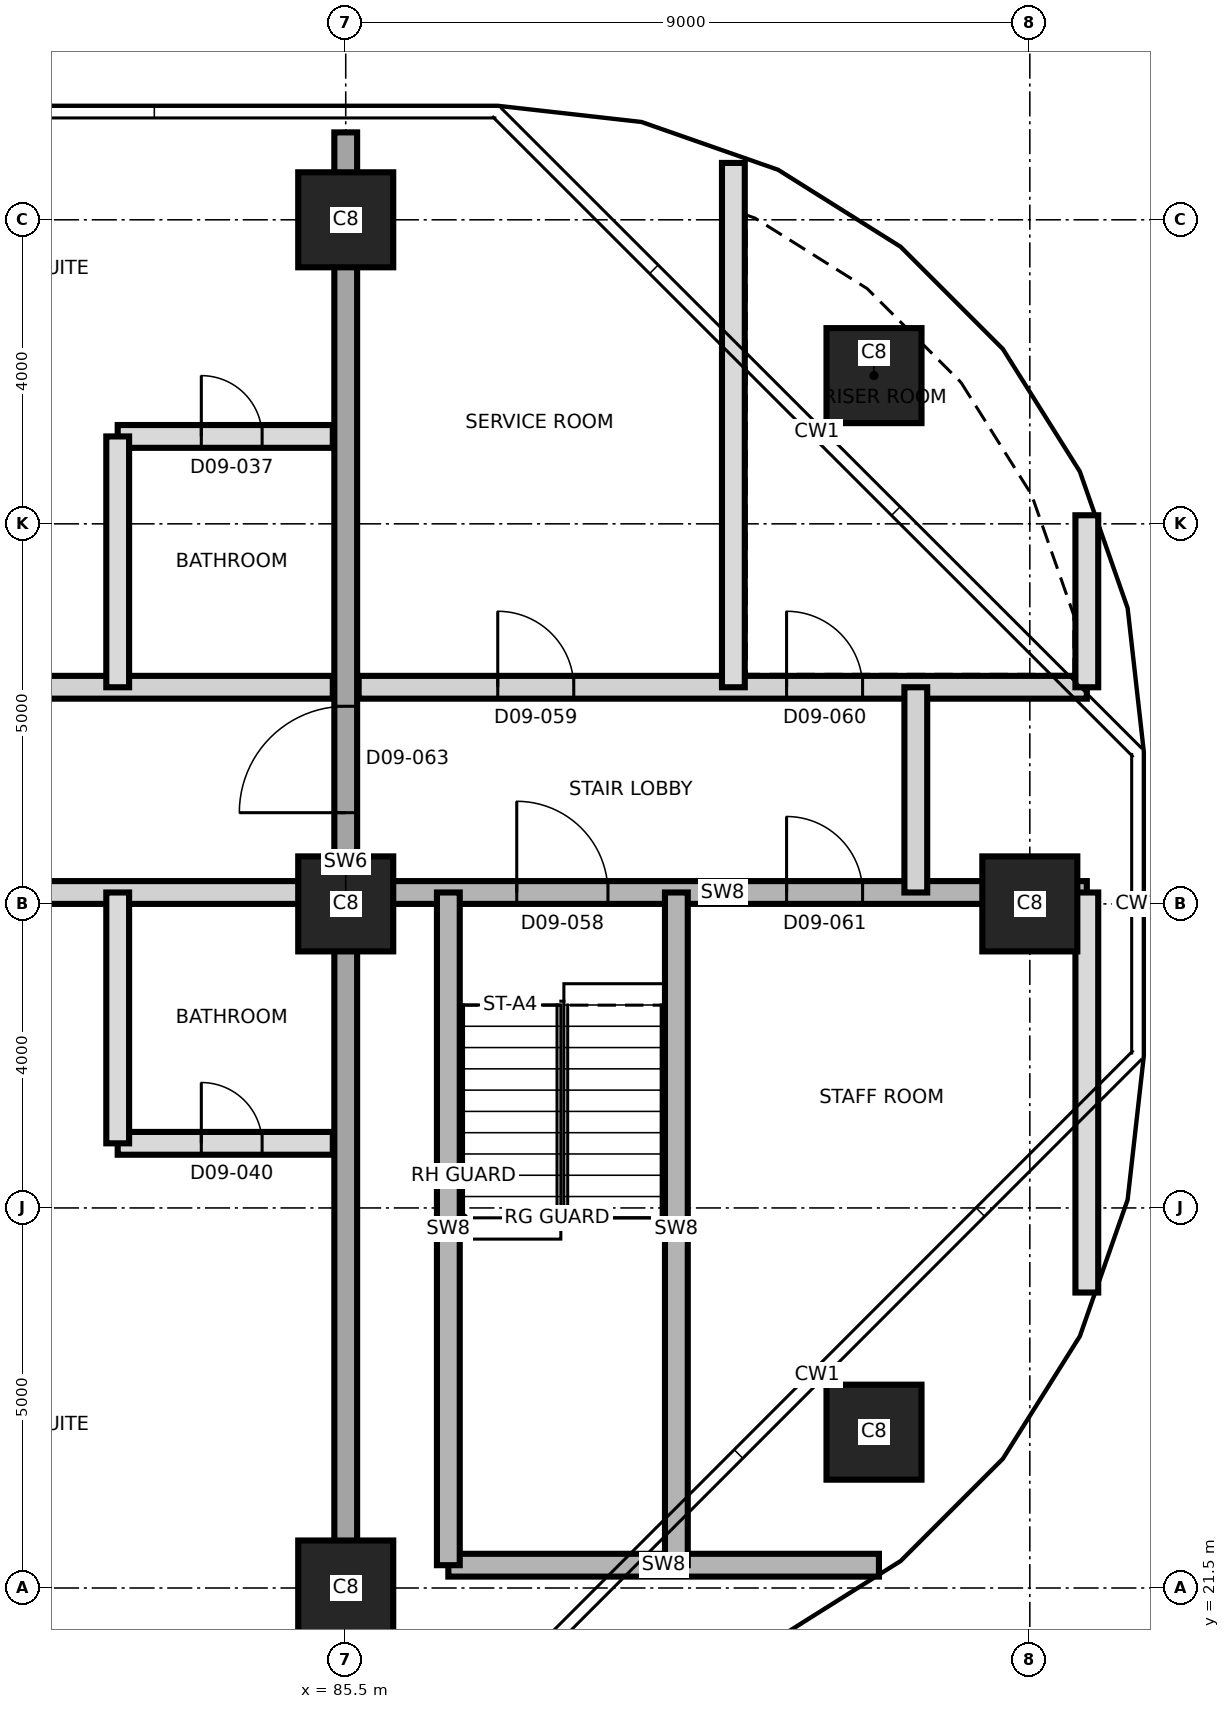
"""IFC4 building model, lengths in metres.
Left out: names, types, materials, properties, quantities, classifications, styles, units other than length and angle.
Written with IfcOpenShell. Run it as: python <this file> out.ifc"""

import sys

from ifc_helpers import new_model, si_unit, direction, frame, frame_2d, origin, origin_2d, place, context, subcontext, project, spatial, rectangle, extrude, element, fill, save


model = new_model("IFC4")
c1 = context("Model", 3, precision=1e-05, world=origin(), true_north=direction((0.0, 1.0)))
c2 = subcontext(c1, "Body", "Model", "MODEL_VIEW")
j1 = project(units=[si_unit("LENGTHUNIT", "METRE"), si_unit("PLANEANGLEUNIT", "RADIAN")], contexts=[c1])
p1 = place(None, origin())
s1 = spatial("IfcSite", under=j1, at=p1, CompositionType="ELEMENT")
p2 = place(p1, origin())
s2 = spatial("IfcBuilding", under=s1, at=p2, CompositionType="ELEMENT")
p3 = place(p2, frame((0.0, 0.0, 113.0)))
s3 = spatial("IfcBuildingStorey", under=s2, at=p3, CompositionType="ELEMENT", Elevation=113.0)
for number, where, z_axis, x_axis in (
    (1, (85.5, 21.5, 0.0), (0.0, 0.0, 1.0), (1.0, 0.0, 0.0)),
    (2, (92.45, 23.55, 0.0), (0.0, 0.0, 1.0), (1.0, 0.0, 0.0)),
    (3, (85.5, 30.5, 0.0), (0.0, 0.0, 1.0), (1.0, 0.0, 0.0)),
    (4, (94.5, 30.5, 0.0), (0.0, 0.0, 1.0), (1.0, 0.0, 0.0)),
    (5, (92.45, 37.45, 0.0), (0.0, 0.0, 1.0), (1.0, 0.0, 0.0)),
    (6, (85.5, 39.5, 0.0), (0.0, 0.0, 1.0), (1.0, 0.0, 0.0)),
):
    element("IfcColumn", number, at=place(p3, frame(where, z_axis=z_axis, x_axis=x_axis)), inside=s3, PredefinedType="COLUMN", context=c2, shape_type="SweptSolid", body=[
        extrude(rectangle(XDim=1.25, YDim=1.25, at=origin_2d()), origin(), (0.0, 0.0, 1.0), 3.7),
    ])
p4 = place(p3, frame((85.5, 20.35, 0.0), z_axis=(0.0, 0.0, 1.0), x_axis=(0.0, 1.0, 0.0)))
e7 = element("IfcWall", 7, at=p4, inside=s3, PredefinedType="SHEAR", context=c2, shape_type="SweptSolid", body=[
    extrude(rectangle(XDim=20.3, YDim=0.3, at=frame_2d((10.15, 0.0))), origin(), (0.0, 0.0, 1.0), 3.7),
])
p5 = place(p4, frame((11.35, 0.0, 0.0)))
e8 = element("IfcOpeningElement", 8, at=p5, cuts=e7, PredefinedType="OPENING", context=c2, shape_type="SweptSolid", body=[
    extrude(rectangle(XDim=1.4, YDim=2.1, at=frame_2d((0.7, 1.05))), frame((0.0, 0.16, 0.0), z_axis=(0.0, -1.0, 0.0), x_axis=(1.0, 0.0, 0.0)), (0.0, 0.0, 1.0), 0.32),
])
p6 = place(p3, frame((86.85, 21.8, 0.0), z_axis=(0.0, 0.0, 1.0), x_axis=(1.0, 0.0, 0.0)))
e9 = element("IfcWall", 9, at=p6, inside=s3, PredefinedType="SHEAR", context=c2, shape_type="SweptSolid", body=[
    extrude(rectangle(XDim=5.665, YDim=0.3, at=frame_2d((2.833, 0.0))), origin(), (0.0, 0.0, 1.0), 3.4),
])
p7 = place(p3, frame((82.5, 27.35, 0.0), z_axis=(0.0, 0.0, 1.0), x_axis=(1.0, 0.0, 0.0)))
e10 = element("IfcWall", 10, at=p7, inside=s3, PredefinedType="PARTITIONING", context=c2, shape_type="SweptSolid", body=[
    extrude(rectangle(XDim=2.83, YDim=0.3, at=frame_2d((1.415, 0.0))), origin(), (0.0, 0.0, 1.0), 3.4),
])
p8 = place(p7, frame((1.1, 0.0, 0.0)))
e11 = element("IfcOpeningElement", 11, at=p8, cuts=e10, PredefinedType="OPENING", context=c2, shape_type="SweptSolid", body=[
    extrude(rectangle(XDim=0.8, YDim=2.1, at=frame_2d((0.4, 1.05))), frame((0.0, 0.16, 0.0), z_axis=(0.0, -1.0, 0.0), x_axis=(1.0, 0.0, 0.0)), (0.0, 0.0, 1.0), 0.32),
])
p9 = place(p3, frame((58.8, 30.65, 0.0), z_axis=(0.0, 0.0, 1.0), x_axis=(1.0, 0.0, 0.0)))
e12 = element("IfcWall", 12, at=p9, inside=s3, PredefinedType="PARTITIONING", context=c2, shape_type="SweptSolid", body=[
    extrude(rectangle(XDim=26.53, YDim=0.3, at=frame_2d((13.265, 0.0))), origin(), (0.0, 0.0, 1.0), 3.4),
])
p10 = place(p9, frame((3.115, 0.0, 0.0)))
e13 = element("IfcOpeningElement", 13, at=p10, cuts=e12, PredefinedType="OPENING", context=c2, shape_type="SweptSolid", body=[
    extrude(rectangle(XDim=1.0, YDim=2.1, at=frame_2d((0.5, 1.05))), frame((0.0, 0.16, 0.0), z_axis=(0.0, -1.0, 0.0), x_axis=(1.0, 0.0, 0.0)), (0.0, 0.0, 1.0), 0.32),
])
p11 = place(p9, frame((6.065, 0.0, 0.0)))
e14 = element("IfcOpeningElement", 14, at=p11, cuts=e12, PredefinedType="OPENING", context=c2, shape_type="SweptSolid", body=[
    extrude(rectangle(XDim=1.4, YDim=2.1, at=frame_2d((0.7, 1.05))), frame((0.0, 0.16, 0.0), z_axis=(0.0, -1.0, 0.0), x_axis=(1.0, 0.0, 0.0)), (0.0, 0.0, 1.0), 0.32),
])
p12 = place(p9, frame((9.835, 0.0, 0.0)))
e15 = element("IfcOpeningElement", 15, at=p12, cuts=e12, PredefinedType="OPENING", context=c2, shape_type="SweptSolid", body=[
    extrude(rectangle(XDim=1.2, YDim=2.1, at=frame_2d((0.6, 1.05))), frame((0.0, 0.16, 0.0), z_axis=(0.0, -1.0, 0.0), x_axis=(1.0, 0.0, 0.0)), (0.0, 0.0, 1.0), 0.32),
])
p13 = place(p9, frame((13.085, 0.0, 0.0)))
e16 = element("IfcOpeningElement", 16, at=p13, cuts=e12, PredefinedType="OPENING", context=c2, shape_type="SweptSolid", body=[
    extrude(rectangle(XDim=1.0, YDim=2.1, at=frame_2d((0.5, 1.05))), frame((0.0, 0.16, 0.0), z_axis=(0.0, -1.0, 0.0), x_axis=(1.0, 0.0, 0.0)), (0.0, 0.0, 1.0), 0.32),
])
p14 = place(p9, frame((21.7, 0.0, 0.0)))
e17 = element("IfcOpeningElement", 17, at=p14, cuts=e12, PredefinedType="OPENING", context=c2, shape_type="SweptSolid", body=[
    extrude(rectangle(XDim=1.0, YDim=2.4, at=frame_2d((0.5, 1.2))), frame((0.0, 0.16, 0.0), z_axis=(0.0, -1.0, 0.0), x_axis=(1.0, 0.0, 0.0)), (0.0, 0.0, 1.0), 0.32),
])
p15 = place(p3, frame((85.67, 30.65, 0.0), z_axis=(0.0, 0.0, 1.0), x_axis=(1.0, 0.0, 0.0)))
e18 = element("IfcWall", 18, at=p15, inside=s3, PredefinedType="SHEAR", context=c2, shape_type="SweptSolid", body=[
    extrude(rectangle(XDim=9.58, YDim=0.3, at=frame_2d((4.79, 0.0))), origin(), (0.0, 0.0, 1.0), 3.4),
])
p16 = place(p15, frame((2.08, 0.0, 0.0)))
e19 = element("IfcOpeningElement", 19, at=p16, cuts=e18, PredefinedType="OPENING", context=c2, shape_type="SweptSolid", body=[
    extrude(rectangle(XDim=1.2, YDim=2.1, at=frame_2d((0.6, 1.05))), frame((0.0, 0.16, 0.0), z_axis=(0.0, -1.0, 0.0), x_axis=(1.0, 0.0, 0.0)), (0.0, 0.0, 1.0), 0.32),
])
p17 = place(p15, frame((5.63, 0.0, 0.0)))
e20 = element("IfcOpeningElement", 20, at=p17, cuts=e18, PredefinedType="OPENING", context=c2, shape_type="SweptSolid", body=[
    extrude(rectangle(XDim=1.0, YDim=2.1, at=frame_2d((0.5, 1.05))), frame((0.0, 0.16, 0.0), z_axis=(0.0, -1.0, 0.0), x_axis=(1.0, 0.0, 0.0)), (0.0, 0.0, 1.0), 0.32),
])
p18 = place(p3, frame((58.8, 33.35, 0.0), z_axis=(0.0, 0.0, 1.0), x_axis=(1.0, 0.0, 0.0)))
e21 = element("IfcWall", 21, at=p18, inside=s3, PredefinedType="PARTITIONING", context=c2, shape_type="SweptSolid", body=[
    extrude(rectangle(XDim=26.53, YDim=0.3, at=frame_2d((13.265, 0.0))), origin(), (0.0, 0.0, 1.0), 3.4),
])
p19 = place(p18, frame((2.05, 0.0, 0.0)))
e22 = element("IfcOpeningElement", 22, at=p19, cuts=e21, PredefinedType="OPENING", context=c2, shape_type="SweptSolid", body=[
    extrude(rectangle(XDim=1.0, YDim=2.4, at=frame_2d((0.5, 1.2))), frame((0.0, 0.16, 0.0), z_axis=(0.0, -1.0, 0.0), x_axis=(1.0, 0.0, 0.0)), (0.0, 0.0, 1.0), 0.32),
])
p20 = place(p18, frame((11.95, 0.0, 0.0)))
e23 = element("IfcOpeningElement", 23, at=p20, cuts=e21, PredefinedType="OPENING", context=c2, shape_type="SweptSolid", body=[
    extrude(rectangle(XDim=1.0, YDim=2.1, at=frame_2d((0.5, 1.05))), frame((0.0, 0.16, 0.0), z_axis=(0.0, -1.0, 0.0), x_axis=(1.0, 0.0, 0.0)), (0.0, 0.0, 1.0), 0.32),
])
p21 = place(p18, frame((13.6, 0.0, 0.0)))
e24 = element("IfcOpeningElement", 24, at=p21, cuts=e21, PredefinedType="OPENING", context=c2, shape_type="SweptSolid", body=[
    extrude(rectangle(XDim=1.0, YDim=2.1, at=frame_2d((0.5, 1.05))), frame((0.0, 0.16, 0.0), z_axis=(0.0, -1.0, 0.0), x_axis=(1.0, 0.0, 0.0)), (0.0, 0.0, 1.0), 0.32),
])
p22 = place(p18, frame((21.7, 0.0, 0.0)))
e25 = element("IfcOpeningElement", 25, at=p22, cuts=e21, PredefinedType="OPENING", context=c2, shape_type="SweptSolid", body=[
    extrude(rectangle(XDim=1.0, YDim=2.4, at=frame_2d((0.5, 1.2))), frame((0.0, 0.16, 0.0), z_axis=(0.0, -1.0, 0.0), x_axis=(1.0, 0.0, 0.0)), (0.0, 0.0, 1.0), 0.32),
])
p23 = place(p3, frame((85.67, 33.35, 0.0), z_axis=(0.0, 0.0, 1.0), x_axis=(1.0, 0.0, 0.0)))
e26 = element("IfcWall", 26, at=p23, inside=s3, PredefinedType="PARTITIONING", context=c2, shape_type="SweptSolid", body=[
    extrude(rectangle(XDim=9.58, YDim=0.3, at=frame_2d((4.79, 0.0))), origin(), (0.0, 0.0, 1.0), 3.4),
])
p24 = place(p23, frame((1.83, 0.0, 0.0)))
e27 = element("IfcOpeningElement", 27, at=p24, cuts=e26, PredefinedType="OPENING", context=c2, shape_type="SweptSolid", body=[
    extrude(rectangle(XDim=1.0, YDim=2.1, at=frame_2d((0.5, 1.05))), frame((0.0, 0.16, 0.0), z_axis=(0.0, -1.0, 0.0), x_axis=(1.0, 0.0, 0.0)), (0.0, 0.0, 1.0), 0.32),
])
p25 = place(p23, frame((5.63, 0.0, 0.0)))
e28 = element("IfcOpeningElement", 28, at=p25, cuts=e26, PredefinedType="OPENING", context=c2, shape_type="SweptSolid", body=[
    extrude(rectangle(XDim=1.0, YDim=2.1, at=frame_2d((0.5, 1.05))), frame((0.0, 0.16, 0.0), z_axis=(0.0, -1.0, 0.0), x_axis=(1.0, 0.0, 0.0)), (0.0, 0.0, 1.0), 0.32),
])
p26 = place(p3, frame((82.5, 36.65, 0.0), z_axis=(0.0, 0.0, 1.0), x_axis=(1.0, 0.0, 0.0)))
e29 = element("IfcWall", 29, at=p26, inside=s3, PredefinedType="PARTITIONING", context=c2, shape_type="SweptSolid", body=[
    extrude(rectangle(XDim=2.83, YDim=0.3, at=frame_2d((1.415, 0.0))), origin(), (0.0, 0.0, 1.0), 3.4),
])
p27 = place(p26, frame((1.1, 0.0, 0.0)))
e30 = element("IfcOpeningElement", 30, at=p27, cuts=e29, PredefinedType="OPENING", context=c2, shape_type="SweptSolid", body=[
    extrude(rectangle(XDim=0.8, YDim=2.1, at=frame_2d((0.4, 1.05))), frame((0.0, 0.16, 0.0), z_axis=(0.0, -1.0, 0.0), x_axis=(1.0, 0.0, 0.0)), (0.0, 0.0, 1.0), 0.32),
])
for number, where, z_axis, x_axis in (
    (31, (82.5, 27.35, 0.0), (0.0, 0.0, 1.0), (0.0, 1.0, 0.0)),
    (32, (82.5, 33.35, 0.0), (0.0, 0.0, 1.0), (0.0, 1.0, 0.0)),
):
    element("IfcWall", number, at=place(p3, frame(where, z_axis=z_axis, x_axis=x_axis)), inside=s3, PredefinedType="PARTITIONING", context=c2, shape_type="SweptSolid", body=[
        extrude(rectangle(XDim=3.3, YDim=0.3, at=frame_2d((1.65, 0.0))), origin(), (0.0, 0.0, 1.0), 3.4),
    ])
for number, where, z_axis, x_axis in (
    (33, (86.85, 21.8, 0.0), (0.0, 0.0, 1.0), (0.0, 1.0, 0.0)),
    (34, (89.85, 21.8, 0.0), (0.0, 0.0, 1.0), (0.0, 1.0, 0.0)),
):
    element("IfcWall", number, at=place(p3, frame(where, z_axis=z_axis, x_axis=x_axis)), inside=s3, PredefinedType="SHEAR", context=c2, shape_type="SweptSolid", body=[
        extrude(rectangle(XDim=8.85, YDim=0.3, at=frame_2d((4.425, 0.0))), origin(), (0.0, 0.0, 1.0), 3.4),
    ])
p28 = place(p3, frame((90.6, 33.35, 0.0), z_axis=(0.0, 0.0, 1.0), x_axis=(0.0, 1.0, 0.0)))
e35 = element("IfcWall", 35, at=p28, inside=s3, PredefinedType="PARTITIONING", context=c2, shape_type="SweptSolid", body=[
    extrude(rectangle(XDim=6.898, YDim=0.3, at=frame_2d((3.449, 0.0))), origin(), (0.0, 0.0, 1.0), 3.4),
])
p29 = place(p3, frame((93.0, 30.65, 0.0), z_axis=(0.0, 0.0, 1.0), x_axis=(0.0, 1.0, 0.0)))
e36 = element("IfcWall", 36, at=p29, inside=s3, PredefinedType="PARTITIONING", context=c2, shape_type="SweptSolid", body=[
    extrude(rectangle(XDim=2.7, YDim=0.3, at=frame_2d((1.35, 0.0))), origin(), (0.0, 0.0, 1.0), 3.4),
])
p30 = place(p3, frame((95.25, 25.387, 0.0), z_axis=(0.0, 0.0, 1.0), x_axis=(0.0, 1.0, 0.0)))
e37 = element("IfcWall", 37, at=p30, inside=s3, PredefinedType="PARTITIONING", context=c2, shape_type="SweptSolid", body=[
    extrude(rectangle(XDim=5.263, YDim=0.3, at=frame_2d((2.631, 0.0))), origin(), (0.0, 0.0, 1.0), 3.4),
])
p31 = place(p3, frame((95.25, 33.35, 0.0), z_axis=(0.0, 0.0, 1.0), x_axis=(0.0, 1.0, 0.0)))
e38 = element("IfcWall", 38, at=p31, inside=s3, PredefinedType="PARTITIONING", context=c2, shape_type="SweptSolid", body=[
    extrude(rectangle(XDim=2.263, YDim=0.3, at=frame_2d((1.131, 0.0))), origin(), (0.0, 0.0, 1.0), 3.4),
])
p32 = place(p27, origin())
e39 = element("IfcDoor", 39, at=p32, inside=s3, OperationType="SINGLE_SWING_RIGHT", PredefinedType="DOOR", context=c2, shape_type="SweptSolid", body=[
    extrude(rectangle(XDim=0.8, YDim=2.1, at=frame_2d((0.4, 1.05))), frame((0.0, 0.025, 0.0), z_axis=(0.0, -1.0, 0.0), x_axis=(1.0, 0.0, 0.0)), (0.0, 0.0, 1.0), 0.05),
])
fill(e30, e39)
p33 = place(p8, origin())
e40 = element("IfcDoor", 40, at=p33, inside=s3, OperationType="SINGLE_SWING_RIGHT", PredefinedType="DOOR", context=c2, shape_type="SweptSolid", body=[
    extrude(rectangle(XDim=0.8, YDim=2.1, at=frame_2d((0.4, 1.05))), frame((0.0, 0.025, 0.0), z_axis=(0.0, -1.0, 0.0), x_axis=(1.0, 0.0, 0.0)), (0.0, 0.0, 1.0), 0.05),
])
fill(e11, e40)
p34 = place(p16, origin())
e41 = element("IfcDoor", 41, at=p34, inside=s3, OperationType="SINGLE_SWING_LEFT", PredefinedType="DOOR", context=c2, shape_type="SweptSolid", body=[
    extrude(rectangle(XDim=1.2, YDim=2.1, at=frame_2d((0.6, 1.05))), frame((0.0, 0.025, 0.0), z_axis=(0.0, -1.0, 0.0), x_axis=(1.0, 0.0, 0.0)), (0.0, 0.0, 1.0), 0.05),
])
fill(e19, e41)
p35 = place(p24, origin())
e42 = element("IfcDoor", 42, at=p35, inside=s3, OperationType="SINGLE_SWING_LEFT", PredefinedType="DOOR", context=c2, shape_type="SweptSolid", body=[
    extrude(rectangle(XDim=1.0, YDim=2.1, at=frame_2d((0.5, 1.05))), frame((0.0, 0.025, 0.0), z_axis=(0.0, -1.0, 0.0), x_axis=(1.0, 0.0, 0.0)), (0.0, 0.0, 1.0), 0.05),
])
fill(e27, e42)
p36 = place(p25, origin())
e43 = element("IfcDoor", 43, at=p36, inside=s3, OperationType="SINGLE_SWING_RIGHT", PredefinedType="DOOR", context=c2, shape_type="SweptSolid", body=[
    extrude(rectangle(XDim=1.0, YDim=2.1, at=frame_2d((0.5, 1.05))), frame((0.0, 0.025, 0.0), z_axis=(0.0, -1.0, 0.0), x_axis=(1.0, 0.0, 0.0)), (0.0, 0.0, 1.0), 0.05),
])
fill(e28, e43)
p37 = place(p17, origin())
e44 = element("IfcDoor", 44, at=p37, inside=s3, OperationType="SINGLE_SWING_LEFT", PredefinedType="DOOR", context=c2, shape_type="SweptSolid", body=[
    extrude(rectangle(XDim=1.0, YDim=2.1, at=frame_2d((0.5, 1.05))), frame((0.0, 0.025, 0.0), z_axis=(0.0, -1.0, 0.0), x_axis=(1.0, 0.0, 0.0)), (0.0, 0.0, 1.0), 0.05),
])
fill(e20, e44)
p38 = place(p5, origin())
e45 = element("IfcDoor", 45, at=p38, inside=s3, OperationType="SINGLE_SWING_RIGHT", PredefinedType="DOOR", context=c2, shape_type="SweptSolid", body=[
    extrude(rectangle(XDim=1.4, YDim=2.1, at=frame_2d((0.7, 1.05))), frame((0.0, 0.025, 0.0), z_axis=(0.0, -1.0, 0.0), x_axis=(1.0, 0.0, 0.0)), (0.0, 0.0, 1.0), 0.05),
])
fill(e8, e45)
save(model, sys.argv[1])
